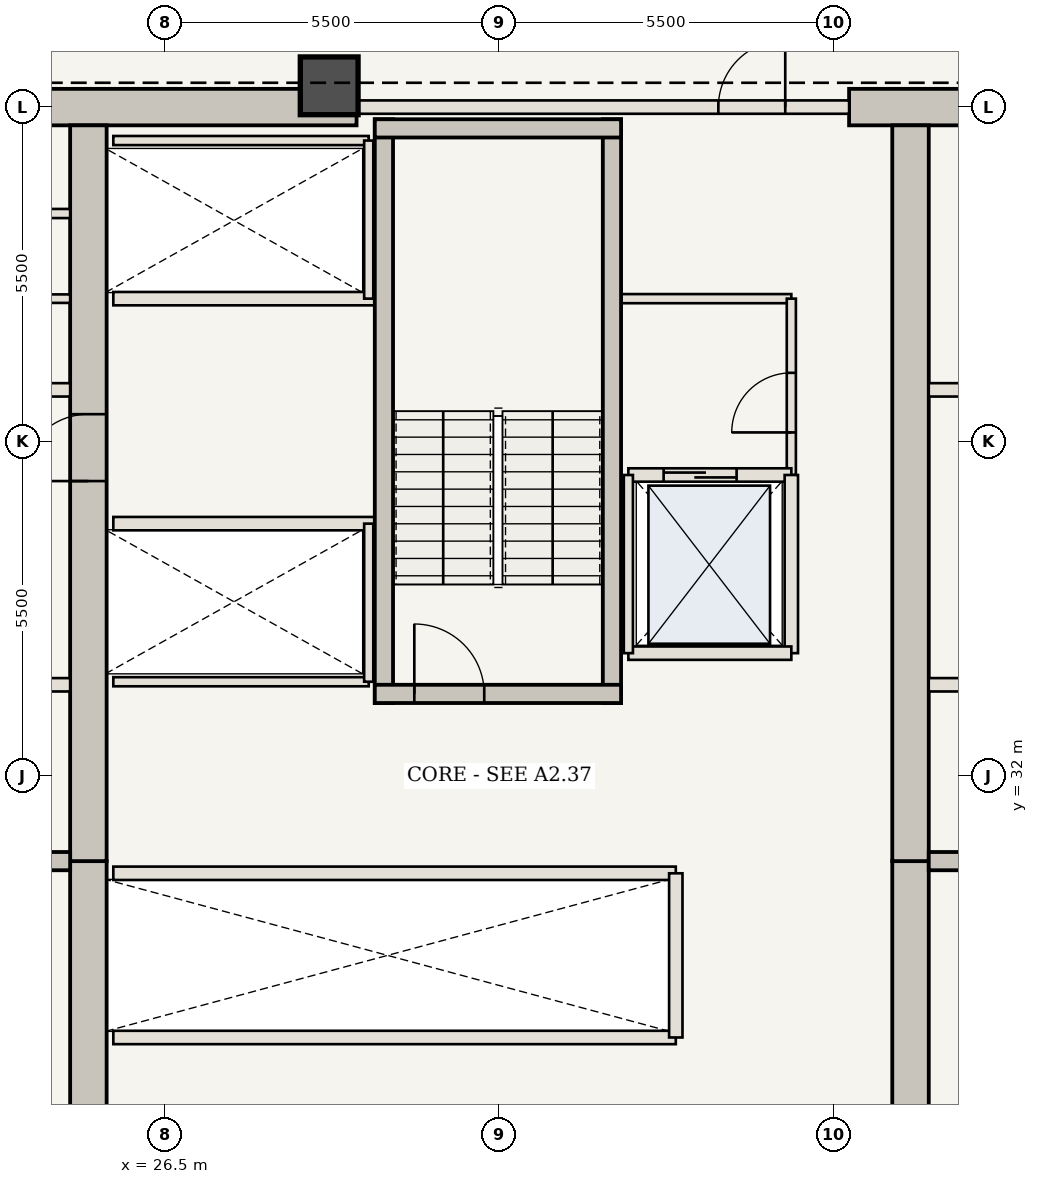
"""IFC4 building model, lengths in metres.
Left out: names, types, materials, properties, quantities, classifications, styles, units other than length and angle.
Written with IfcOpenShell. Run it as: python <this file> out.ifc"""

import sys

from ifc_helpers import new_model, si_unit, direction, frame, frame_2d, origin, origin_2d, place, context, subcontext, project, spatial, rectangle, extrude, element, fill, save


model = new_model("IFC4")
c1 = context("Model", 3, precision=1e-05, world=origin(), true_north=direction((0.0, 1.0)))
c2 = subcontext(c1, "Body", "Model", "MODEL_VIEW")
j1 = project(units=[si_unit("LENGTHUNIT", "METRE"), si_unit("PLANEANGLEUNIT", "RADIAN")], contexts=[c1])
p1 = place(None, origin())
s1 = spatial("IfcSite", under=j1, at=p1, CompositionType="ELEMENT")
p2 = place(p1, origin())
s2 = spatial("IfcBuilding", under=s1, at=p2, CompositionType="ELEMENT")
p3 = place(p2, frame((0.0, 0.0, 164.5)))
s3 = spatial("IfcBuildingStorey", under=s2, at=p3, CompositionType="ELEMENT", Elevation=164.5)
p4 = place(p3, frame((21.41, 43.0, 0.0), z_axis=(0.0, 0.0, 1.0), x_axis=(1.0, 0.0, 0.0)))
e1 = element("IfcWall", 1, at=p4, inside=s3, PredefinedType="SHEAR", context=c2, shape_type="SweptSolid", body=[
    extrude(rectangle(XDim=8.24, YDim=0.6, at=frame_2d((4.12, 0.0))), origin(), (0.0, 0.0, 1.0), 3.85),
])
p5 = place(p3, frame((37.75, 43.0, 0.0), z_axis=(0.0, 0.0, 1.0), x_axis=(1.0, 0.0, 0.0)))
e2 = element("IfcWall", 2, at=p5, inside=s3, PredefinedType="SHEAR", context=c2, shape_type="SweptSolid", body=[
    extrude(rectangle(XDim=4.84, YDim=0.6, at=frame_2d((2.42, 0.0))), origin(), (0.0, 0.0, 1.0), 3.85),
])
p6 = place(p3, frame((25.24, 21.25, 0.0), z_axis=(0.0, 0.0, 1.0), x_axis=(0.0, 1.0, 0.0)))
e3 = element("IfcWall", 3, at=p6, inside=s3, PredefinedType="SHEAR", context=c2, shape_type="SweptSolid", body=[
    extrude(rectangle(XDim=9.35, YDim=0.6, at=frame_2d((4.675, 0.0))), origin(), (0.0, 0.0, 1.0), 3.85),
])
p7 = place(p3, frame((25.24, 30.6, 0.0), z_axis=(0.0, 0.0, 1.0), x_axis=(0.0, 1.0, 0.0)))
e4 = element("IfcWall", 4, at=p7, inside=s3, PredefinedType="SHEAR", context=c2, shape_type="SweptSolid", body=[
    extrude(rectangle(XDim=12.1, YDim=0.6, at=frame_2d((6.05, 0.0))), origin(), (0.0, 0.0, 1.0), 3.85),
])
p8 = place(p7, frame((6.25, 0.0, 0.0)))
e5 = element("IfcOpeningElement", 5, at=p8, cuts=e4, PredefinedType="OPENING", context=c2, shape_type="SweptSolid", body=[
    extrude(rectangle(XDim=1.1, YDim=2.15, at=frame_2d((0.55, 1.075))), frame((0.0, 0.31, 0.0), z_axis=(0.0, -1.0, 0.0), x_axis=(1.0, 0.0, 0.0)), (0.0, 0.0, 1.0), 0.62),
])
p9 = place(p3, frame((38.76, 21.25, 0.0), z_axis=(0.0, 0.0, 1.0), x_axis=(0.0, 1.0, 0.0)))
e6 = element("IfcWall", 6, at=p9, inside=s3, PredefinedType="SHEAR", context=c2, shape_type="SweptSolid", body=[
    extrude(rectangle(XDim=9.35, YDim=0.6, at=frame_2d((4.675, 0.0))), origin(), (0.0, 0.0, 1.0), 3.85),
])
p10 = place(p3, frame((38.76, 30.6, 0.0), z_axis=(0.0, 0.0, 1.0), x_axis=(0.0, 1.0, 0.0)))
e7 = element("IfcWall", 7, at=p10, inside=s3, PredefinedType="SHEAR", context=c2, shape_type="SweptSolid", body=[
    extrude(rectangle(XDim=12.1, YDim=0.6, at=frame_2d((6.05, 0.0))), origin(), (0.0, 0.0, 1.0), 3.85),
])
p11 = place(p3, frame((29.2, 43.35, 0.0), z_axis=(0.0, 0.0, 1.0), x_axis=(1.0, 0.0, 0.0)))
e8 = element("IfcColumn", 8, at=p11, inside=s3, PredefinedType="COLUMN", context=c2, shape_type="SweptSolid", body=[
    extrude(rectangle(XDim=0.95, YDim=0.95, at=origin_2d()), origin(), (0.0, 0.0, 1.0), 3.85),
])
for number, where, z_axis, x_axis in (
    (9, (21.41, 30.6, 0.0), (0.0, 0.0, 1.0), (1.0, 0.0, 0.0)),
    (10, (39.06, 30.6, 0.0), (0.0, 0.0, 1.0), (1.0, 0.0, 0.0)),
):
    element("IfcWall", number, at=place(p3, frame(where, z_axis=z_axis, x_axis=x_axis)), inside=s3, PredefinedType="SHEAR", context=c2, shape_type="SweptSolid", body=[
        extrude(rectangle(XDim=3.53, YDim=0.3, at=frame_2d((1.765, 0.0))), origin(), (0.0, 0.0, 1.0), 3.685),
    ])
p12 = place(p3, frame((21.41, 33.5, 0.0), z_axis=(0.0, 0.0, 1.0), x_axis=(1.0, 0.0, 0.0)))
e11 = element("IfcWall", 11, at=p12, inside=s3, PredefinedType="STANDARD", context=c2, shape_type="SweptSolid", body=[
    extrude(rectangle(XDim=3.53, YDim=0.22, at=frame_2d((1.765, 0.0))), origin(), (0.0, 0.0, 1.0), 3.685),
])
p13 = place(p12, frame((0.75, 0.0, 0.0)))
e12 = element("IfcOpeningElement", 12, at=p13, cuts=e11, PredefinedType="OPENING", context=c2, shape_type="SweptSolid", body=[
    extrude(rectangle(XDim=1.2, YDim=2.2, at=frame_2d((0.6, 1.1))), frame((0.0, 0.12, 0.0), z_axis=(0.0, -1.0, 0.0), x_axis=(1.0, 0.0, 0.0)), (0.0, 0.0, 1.0), 0.24),
])
p14 = place(p3, frame((39.06, 33.5, 0.0), z_axis=(0.0, 0.0, 1.0), x_axis=(1.0, 0.0, 0.0)))
e13 = element("IfcWall", 13, at=p14, inside=s3, PredefinedType="STANDARD", context=c2, shape_type="SweptSolid", body=[
    extrude(rectangle(XDim=3.53, YDim=0.22, at=frame_2d((1.765, 0.0))), origin(), (0.0, 0.0, 1.0), 3.685),
])
p15 = place(p14, frame((1.55, 0.0, 0.0)))
e14 = element("IfcOpeningElement", 14, at=p15, cuts=e13, PredefinedType="OPENING", context=c2, shape_type="SweptSolid", body=[
    extrude(rectangle(XDim=1.2, YDim=2.2, at=frame_2d((0.6, 1.1))), frame((0.0, 0.12, 0.0), z_axis=(0.0, -1.0, 0.0), x_axis=(1.0, 0.0, 0.0)), (0.0, 0.0, 1.0), 0.24),
])
for number, where, z_axis, x_axis in (
    (15, (21.41, 38.35, 0.0), (0.0, 0.0, 1.0), (1.0, 0.0, 0.0)),
    (16, (39.06, 38.35, 0.0), (0.0, 0.0, 1.0), (1.0, 0.0, 0.0)),
):
    element("IfcWall", number, at=place(p3, frame(where, z_axis=z_axis, x_axis=x_axis)), inside=s3, PredefinedType="STANDARD", context=c2, shape_type="SweptSolid", body=[
        extrude(rectangle(XDim=3.53, YDim=0.22, at=frame_2d((1.765, 0.0))), origin(), (0.0, 0.0, 1.0), 3.685),
    ])
p16 = place(p3, frame((21.41, 39.85, 0.0), z_axis=(0.0, 0.0, 1.0), x_axis=(1.0, 0.0, 0.0)))
e17 = element("IfcWall", 17, at=p16, inside=s3, PredefinedType="STANDARD", context=c2, shape_type="SweptSolid", body=[
    extrude(rectangle(XDim=3.53, YDim=0.14, at=frame_2d((1.765, 0.0))), origin(), (0.0, 0.0, 1.0), 3.685),
])
p17 = place(p3, frame((21.41, 41.25, 0.0), z_axis=(0.0, 0.0, 1.0), x_axis=(1.0, 0.0, 0.0)))
e18 = element("IfcWall", 18, at=p17, inside=s3, PredefinedType="STANDARD", context=c2, shape_type="SweptSolid", body=[
    extrude(rectangle(XDim=3.53, YDim=0.15, at=frame_2d((1.765, 0.0))), origin(), (0.0, 0.0, 1.0), 3.685),
])
p18 = place(p3, frame((34.0, 39.85, 0.0), z_axis=(0.0, 0.0, 1.0), x_axis=(1.0, 0.0, 0.0)))
e19 = element("IfcWall", 19, at=p18, inside=s3, PredefinedType="STANDARD", context=c2, shape_type="SweptSolid", body=[
    extrude(rectangle(XDim=2.8, YDim=0.15, at=frame_2d((1.4, 0.0))), origin(), (0.0, 0.0, 1.0), 3.685),
])
p19 = place(p3, frame((36.8, 36.95, 0.0), z_axis=(0.0, 0.0, 1.0), x_axis=(0.0, 1.0, 0.0)))
e20 = element("IfcWall", 20, at=p19, inside=s3, PredefinedType="STANDARD", context=c2, shape_type="SweptSolid", body=[
    extrude(rectangle(XDim=2.9, YDim=0.15, at=frame_2d((1.45, 0.0))), origin(), (0.0, 0.0, 1.0), 3.685),
])
p20 = place(p19, frame((0.7, 0.0, 0.0)))
e21 = element("IfcOpeningElement", 21, at=p20, cuts=e20, PredefinedType="OPENING", context=c2, shape_type="SweptSolid", body=[
    extrude(rectangle(XDim=0.98, YDim=2.2, at=frame_2d((0.49, 1.1))), frame((0.0, 0.085, 0.0), z_axis=(0.0, -1.0, 0.0), x_axis=(1.0, 0.0, 0.0)), (0.0, 0.0, 1.0), 0.17),
])
for number, where, z_axis, x_axis in (
    (22, (25.65, 27.7, 0.0), (0.0, 0.0, 1.0), (1.0, 0.0, 0.0)),
    (23, (25.65, 30.4, 0.0), (0.0, 0.0, 1.0), (1.0, 0.0, 0.0)),
):
    element("IfcWall", number, at=place(p3, frame(where, z_axis=z_axis, x_axis=x_axis)), inside=s3, PredefinedType="STANDARD", context=c2, shape_type="SweptSolid", body=[
        extrude(rectangle(XDim=9.25, YDim=0.22, at=frame_2d((4.625, 0.0))), origin(), (0.0, 0.0, 1.0), 3.685),
    ])
p21 = place(p3, frame((34.9, 27.7, 0.0), z_axis=(0.0, 0.0, 1.0), x_axis=(0.0, 1.0, 0.0)))
e24 = element("IfcWall", 24, at=p21, inside=s3, PredefinedType="STANDARD", context=c2, shape_type="SweptSolid", body=[
    extrude(rectangle(XDim=2.7, YDim=0.22, at=frame_2d((1.35, 0.0))), origin(), (0.0, 0.0, 1.0), 3.685),
])
p22 = place(p3, frame((25.65, 36.15, 0.0), z_axis=(0.0, 0.0, 1.0), x_axis=(1.0, 0.0, 0.0)))
e25 = element("IfcWall", 25, at=p22, inside=s3, PredefinedType="STANDARD", context=c2, shape_type="SweptSolid", body=[
    extrude(rectangle(XDim=4.3, YDim=0.22, at=frame_2d((2.15, 0.0))), origin(), (0.0, 0.0, 1.0), 3.685),
])
p23 = place(p3, frame((25.65, 33.55, 0.0), z_axis=(0.0, 0.0, 1.0), x_axis=(1.0, 0.0, 0.0)))
e26 = element("IfcWall", 26, at=p23, inside=s3, PredefinedType="STANDARD", context=c2, shape_type="SweptSolid", body=[
    extrude(rectangle(XDim=4.2, YDim=0.15, at=frame_2d((2.1, 0.0))), origin(), (0.0, 0.0, 1.0), 3.685),
])
p24 = place(p3, frame((29.85, 33.55, 0.0), z_axis=(0.0, 0.0, 1.0), x_axis=(0.0, 1.0, 0.0)))
e27 = element("IfcWall", 27, at=p24, inside=s3, PredefinedType="STANDARD", context=c2, shape_type="SweptSolid", body=[
    extrude(rectangle(XDim=2.6, YDim=0.15, at=frame_2d((1.3, 0.0))), origin(), (0.0, 0.0, 1.0), 3.685),
])
p25 = place(p3, frame((25.65, 39.85, 0.0), z_axis=(0.0, 0.0, 1.0), x_axis=(1.0, 0.0, 0.0)))
e28 = element("IfcWall", 28, at=p25, inside=s3, PredefinedType="STANDARD", context=c2, shape_type="SweptSolid", body=[
    extrude(rectangle(XDim=4.3, YDim=0.22, at=frame_2d((2.15, 0.0))), origin(), (0.0, 0.0, 1.0), 3.685),
])
p26 = place(p3, frame((25.65, 42.45, 0.0), z_axis=(0.0, 0.0, 1.0), x_axis=(1.0, 0.0, 0.0)))
e29 = element("IfcWall", 29, at=p26, inside=s3, PredefinedType="STANDARD", context=c2, shape_type="SweptSolid", body=[
    extrude(rectangle(XDim=4.2, YDim=0.15, at=frame_2d((2.1, 0.0))), origin(), (0.0, 0.0, 1.0), 3.685),
])
p27 = place(p3, frame((29.85, 39.85, 0.0), z_axis=(0.0, 0.0, 1.0), x_axis=(0.0, 1.0, 0.0)))
e30 = element("IfcWall", 30, at=p27, inside=s3, PredefinedType="STANDARD", context=c2, shape_type="SweptSolid", body=[
    extrude(rectangle(XDim=2.6, YDim=0.15, at=frame_2d((1.3, 0.0))), origin(), (0.0, 0.0, 1.0), 3.685),
])
for number, where, z_axis, x_axis in (
    (31, (30.1, 33.2, 0.0), (0.0, 0.0, 1.0), (0.0, 1.0, 0.0)),
    (32, (33.85, 33.2, 0.0), (0.0, 0.0, 1.0), (0.0, 1.0, 0.0)),
):
    element("IfcWall", number, at=place(p3, frame(where, z_axis=z_axis, x_axis=x_axis)), inside=s3, PredefinedType="SHEAR", context=c2, shape_type="SweptSolid", body=[
        extrude(rectangle(XDim=9.6, YDim=0.3, at=frame_2d((4.8, 0.0))), origin(), (0.0, 0.0, 1.0), 3.685),
    ])
p28 = place(p3, frame((29.95, 33.35, 0.0), z_axis=(0.0, 0.0, 1.0), x_axis=(1.0, 0.0, 0.0)))
e33 = element("IfcWall", 33, at=p28, inside=s3, PredefinedType="SHEAR", context=c2, shape_type="SweptSolid", body=[
    extrude(rectangle(XDim=4.05, YDim=0.3, at=frame_2d((2.025, 0.0))), origin(), (0.0, 0.0, 1.0), 3.685),
])
p29 = place(p28, frame((0.65, 0.0, 0.0)))
e34 = element("IfcOpeningElement", 34, at=p29, cuts=e33, PredefinedType="OPENING", context=c2, shape_type="SweptSolid", body=[
    extrude(rectangle(XDim=1.15, YDim=2.15, at=frame_2d((0.575, 1.075))), frame((0.0, 0.16, 0.0), z_axis=(0.0, -1.0, 0.0), x_axis=(1.0, 0.0, 0.0)), (0.0, 0.0, 1.0), 0.32),
])
p30 = place(p3, frame((29.95, 42.65, 0.0), z_axis=(0.0, 0.0, 1.0), x_axis=(1.0, 0.0, 0.0)))
e35 = element("IfcWall", 35, at=p30, inside=s3, PredefinedType="SHEAR", context=c2, shape_type="SweptSolid", body=[
    extrude(rectangle(XDim=4.05, YDim=0.3, at=frame_2d((2.025, 0.0))), origin(), (0.0, 0.0, 1.0), 3.685),
])
p31 = place(p3, frame((29.65, 43.0, 0.0), z_axis=(0.0, 0.0, 1.0), x_axis=(1.0, 0.0, 0.0)))
e36 = element("IfcWall", 36, at=p31, inside=s3, PredefinedType="STANDARD", context=c2, shape_type="SweptSolid", body=[
    extrude(rectangle(XDim=8.1, YDim=0.22, at=frame_2d((4.05, 0.0))), origin(), (0.0, 0.0, 1.0), 3.685),
])
p32 = place(p31, frame((5.95, 0.0, 0.0)))
e37 = element("IfcOpeningElement", 37, at=p32, cuts=e36, PredefinedType="OPENING", context=c2, shape_type="SweptSolid", body=[
    extrude(rectangle(XDim=1.1, YDim=2.15, at=frame_2d((0.55, 1.075))), frame((0.0, 0.12, 0.0), z_axis=(0.0, -1.0, 0.0), x_axis=(1.0, 0.0, 0.0)), (0.0, 0.0, 1.0), 0.24),
])
p33 = place(p3, frame((34.12, 36.95, 0.0), z_axis=(0.0, 0.0, 1.0), x_axis=(1.0, 0.0, 0.0)))
e38 = element("IfcWall", 38, at=p33, inside=s3, PredefinedType="STANDARD", context=c2, shape_type="SweptSolid", body=[
    extrude(rectangle(XDim=2.68, YDim=0.22, at=frame_2d((1.34, 0.0))), origin(), (0.0, 0.0, 1.0), 3.685),
])
p34 = place(p33, frame((0.58, 0.0, 0.0)))
e39 = element("IfcOpeningElement", 39, at=p34, cuts=e38, PredefinedType="OPENING", context=c2, shape_type="SweptSolid", body=[
    extrude(rectangle(XDim=1.2, YDim=2.2, at=frame_2d((0.6, 1.1))), frame((0.0, 0.12, 0.0), z_axis=(0.0, -1.0, 0.0), x_axis=(1.0, 0.0, 0.0)), (0.0, 0.0, 1.0), 0.24),
])
p35 = place(p3, frame((36.8, 34.02, 0.0), z_axis=(0.0, 0.0, 1.0), x_axis=(0.0, 1.0, 0.0)))
e40 = element("IfcWall", 40, at=p35, inside=s3, PredefinedType="STANDARD", context=c2, shape_type="SweptSolid", body=[
    extrude(rectangle(XDim=2.93, YDim=0.22, at=frame_2d((1.465, 0.0))), origin(), (0.0, 0.0, 1.0), 3.685),
])
p36 = place(p3, frame((34.12, 34.02, 0.0), z_axis=(0.0, 0.0, 1.0), x_axis=(1.0, 0.0, 0.0)))
e41 = element("IfcWall", 41, at=p36, inside=s3, PredefinedType="STANDARD", context=c2, shape_type="SweptSolid", body=[
    extrude(rectangle(XDim=2.68, YDim=0.22, at=frame_2d((1.34, 0.0))), origin(), (0.0, 0.0, 1.0), 3.685),
])
p37 = place(p3, frame((34.12, 34.02, 0.0), z_axis=(0.0, 0.0, 1.0), x_axis=(0.0, 1.0, 0.0)))
e42 = element("IfcWall", 42, at=p37, inside=s3, PredefinedType="STANDARD", context=c2, shape_type="SweptSolid", body=[
    extrude(rectangle(XDim=2.93, YDim=0.15, at=frame_2d((1.465, 0.0))), origin(), (0.0, 0.0, 1.0), 3.685),
])
p38 = place(p8, origin())
e43 = element("IfcDoor", 43, at=p38, inside=s3, OperationType="SINGLE_SWING_LEFT", PredefinedType="DOOR", context=c2, shape_type="SweptSolid", body=[
    extrude(rectangle(XDim=1.1, YDim=2.15, at=frame_2d((0.55, 1.075))), frame((0.0, 0.025, 0.0), z_axis=(0.0, -1.0, 0.0), x_axis=(1.0, 0.0, 0.0)), (0.0, 0.0, 1.0), 0.05),
])
fill(e5, e43)
p39 = place(p20, origin())
e44 = element("IfcDoor", 44, at=p39, inside=s3, OperationType="SINGLE_SWING_LEFT", PredefinedType="DOOR", context=c2, shape_type="SweptSolid", body=[
    extrude(rectangle(XDim=0.98, YDim=2.2, at=frame_2d((0.49, 1.1))), frame((0.0, 0.025, 0.0), z_axis=(0.0, -1.0, 0.0), x_axis=(1.0, 0.0, 0.0)), (0.0, 0.0, 1.0), 0.05),
])
fill(e21, e44)
p40 = place(p29, origin())
e45 = element("IfcDoor", 45, at=p40, inside=s3, OperationType="SINGLE_SWING_LEFT", PredefinedType="DOOR", context=c2, shape_type="SweptSolid", body=[
    extrude(rectangle(XDim=1.15, YDim=2.15, at=frame_2d((0.575, 1.075))), frame((0.0, 0.025, 0.0), z_axis=(0.0, -1.0, 0.0), x_axis=(1.0, 0.0, 0.0)), (0.0, 0.0, 1.0), 0.05),
])
fill(e34, e45)
p41 = place(p32, origin())
e46 = element("IfcDoor", 46, at=p41, inside=s3, OperationType="SINGLE_SWING_RIGHT", PredefinedType="DOOR", context=c2, shape_type="SweptSolid", body=[
    extrude(rectangle(XDim=1.1, YDim=2.15, at=frame_2d((0.55, 1.075))), frame((0.0, 0.025, 0.0), z_axis=(0.0, -1.0, 0.0), x_axis=(1.0, 0.0, 0.0)), (0.0, 0.0, 1.0), 0.05),
])
fill(e37, e46)
p42 = place(p34, origin())
e47 = element("IfcDoor", 47, at=p42, inside=s3, OperationType="DOUBLE_DOOR_SLIDING", PredefinedType="DOOR", context=c2, shape_type="SweptSolid", body=[
    extrude(rectangle(XDim=1.2, YDim=2.2, at=frame_2d((0.6, 1.1))), frame((0.0, 0.025, 0.0), z_axis=(0.0, -1.0, 0.0), x_axis=(1.0, 0.0, 0.0)), (0.0, 0.0, 1.0), 0.05),
])
fill(e39, e47)
save(model, sys.argv[1])
